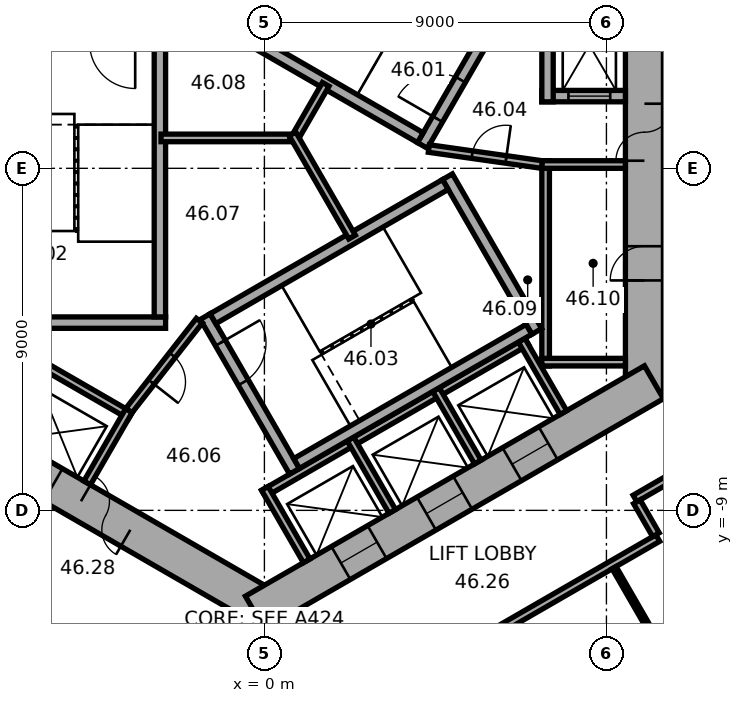
"""IFC4 building model, lengths in metres.
Left out: names, types, materials, properties, quantities, classifications, styles, units other than length and angle.
Written with IfcOpenShell. Run it as: python <this file> out.ifc"""

import sys

from ifc_helpers import new_model, si_unit, direction, frame, frame_2d, origin, place, context, subcontext, project, spatial, rectangle, extrude, element, fill, save


model = new_model("IFC4")
c1 = context("Model", 3, precision=1e-05, world=origin(), true_north=direction((0.0, 1.0)))
c2 = subcontext(c1, "Body", "Model", "MODEL_VIEW")
j1 = project(units=[si_unit("LENGTHUNIT", "METRE"), si_unit("PLANEANGLEUNIT", "RADIAN")], contexts=[c1])
p1 = place(None, origin())
s1 = spatial("IfcSite", under=j1, at=p1, CompositionType="ELEMENT")
p2 = place(p1, origin())
s2 = spatial("IfcBuilding", under=s1, at=p2, CompositionType="ELEMENT")
p3 = place(p2, frame((0.0, 0.0, 187.3)))
s3 = spatial("IfcBuildingStorey", under=s2, at=p3, CompositionType="ELEMENT", Elevation=187.3)
p4 = place(p3, frame((10.0, -6.062, 0.0), z_axis=(0.0, 0.0, 1.0), x_axis=(0.0, 1.0, 0.0)))
e1 = element("IfcWall", 1, at=p4, inside=s3, PredefinedType="SHEAR", context=c2, shape_type="SweptSolid", body=[
    extrude(rectangle(XDim=12.125, YDim=1.0, at=frame_2d((6.062, 0.0))), origin(), (0.0, 0.0, 1.0), 3.7),
])
p5 = place(p4, frame((6.262, 0.0, 0.0)))
e2 = element("IfcOpeningElement", 2, at=p5, cuts=e1, PredefinedType="OPENING", context=c2, shape_type="SweptSolid", body=[
    extrude(rectangle(XDim=1.5, YDim=2.1, at=frame_2d((0.75, 1.05))), frame((0.0, 0.51, 0.0), z_axis=(0.0, -1.0, 0.0), x_axis=(1.0, 0.0, 0.0)), (0.0, 0.0, 1.0), 1.02),
])
p6 = place(p4, frame((3.112, 0.0, 0.0)))
e3 = element("IfcOpeningElement", 3, at=p6, cuts=e1, PredefinedType="OPENING", context=c2, shape_type="SweptSolid", body=[
    extrude(rectangle(XDim=0.9, YDim=2.1, at=frame_2d((0.45, 1.05))), frame((0.0, 0.51, 0.0), z_axis=(0.0, -1.0, 0.0), x_axis=(1.0, 0.0, 0.0)), (0.0, 0.0, 1.0), 1.02),
])
p7 = place(p3, frame((-10.25, -5.629, 0.0), z_axis=(0.0, 0.0, 1.0), x_axis=(0.866022616891, -0.50000482701, 0.0)))
e4 = element("IfcWall", 4, at=p7, inside=s3, PredefinedType="SHEAR", context=c2, shape_type="SweptSolid", body=[
    extrude(rectangle(XDim=12.125, YDim=1.0, at=frame_2d((6.062, 0.0))), origin(), (0.0, 0.0, 1.0), 3.7),
])
p8 = place(p7, frame((6.262, 0.0, 0.0)))
e5 = element("IfcOpeningElement", 5, at=p8, cuts=e4, PredefinedType="OPENING", context=c2, shape_type="SweptSolid", body=[
    extrude(rectangle(XDim=1.5, YDim=2.1, at=frame_2d((0.75, 1.05))), frame((0.0, 0.51, 0.0), z_axis=(0.0, -1.0, 0.0), x_axis=(1.0, 0.0, 0.0)), (0.0, 0.0, 1.0), 1.02),
])
p9 = place(p7, frame((1.712, 0.0, 0.0)))
e6 = element("IfcOpeningElement", 6, at=p9, cuts=e4, PredefinedType="OPENING", context=c2, shape_type="SweptSolid", body=[
    extrude(rectangle(XDim=1.1, YDim=2.1, at=frame_2d((0.55, 1.05))), frame((0.0, 0.51, 0.0), z_axis=(0.0, -1.0, 0.0), x_axis=(1.0, 0.0, 0.0)), (0.0, 0.0, 1.0), 1.02),
])
p10 = place(p7, frame((4.312, 0.0, 0.0)))
e7 = element("IfcOpeningElement", 7, at=p10, cuts=e4, PredefinedType="OPENING", context=c2, shape_type="SweptSolid", body=[
    extrude(rectangle(XDim=1.1, YDim=2.1, at=frame_2d((0.55, 1.05))), frame((0.0, 0.51, 0.0), z_axis=(0.0, -1.0, 0.0), x_axis=(1.0, 0.0, 0.0)), (0.0, 0.0, 1.0), 1.02),
])
p11 = place(p3, frame((-0.25, -11.691, 0.0), z_axis=(0.0, 0.0, 1.0), x_axis=(0.866022616891, 0.50000482701, 0.0)))
e8 = element("IfcWall", 8, at=p11, inside=s3, PredefinedType="SHEAR", context=c2, shape_type="SweptSolid", body=[
    extrude(rectangle(XDim=12.125, YDim=1.0, at=frame_2d((6.062, 0.0))), origin(), (0.0, 0.0, 1.0), 3.7),
])
p12 = place(p11, frame((2.612, 0.0, 0.0)))
e9 = element("IfcOpeningElement", 9, at=p12, cuts=e8, PredefinedType="OPENING", context=c2, shape_type="SweptSolid", body=[
    extrude(rectangle(XDim=1.1, YDim=2.1, at=frame_2d((0.55, 1.05))), frame((0.0, 0.51, 0.0), z_axis=(0.0, -1.0, 0.0), x_axis=(1.0, 0.0, 0.0)), (0.0, 0.0, 1.0), 1.02),
])
p13 = place(p11, frame((5.212, 0.0, 0.0)))
e10 = element("IfcOpeningElement", 10, at=p13, cuts=e8, PredefinedType="OPENING", context=c2, shape_type="SweptSolid", body=[
    extrude(rectangle(XDim=1.1, YDim=2.1, at=frame_2d((0.55, 1.05))), frame((0.0, 0.51, 0.0), z_axis=(0.0, -1.0, 0.0), x_axis=(1.0, 0.0, 0.0)), (0.0, 0.0, 1.0), 1.02),
])
p14 = place(p11, frame((7.812, 0.0, 0.0)))
e11 = element("IfcOpeningElement", 11, at=p14, cuts=e8, PredefinedType="OPENING", context=c2, shape_type="SweptSolid", body=[
    extrude(rectangle(XDim=1.1, YDim=2.1, at=frame_2d((0.55, 1.05))), frame((0.0, 0.51, 0.0), z_axis=(0.0, -1.0, 0.0), x_axis=(1.0, 0.0, 0.0)), (0.0, 0.0, 1.0), 1.02),
])
p15 = place(p3, frame((7.4, -5.2, 0.0), z_axis=(0.0, 0.0, 1.0), x_axis=(0.0, 1.0, 0.0)))
e12 = element("IfcWall", 12, at=p15, inside=s3, PredefinedType="PARTITIONING", context=c2, shape_type="SweptSolid", body=[
    extrude(rectangle(XDim=5.4, YDim=0.2, at=frame_2d((2.7, 0.0))), origin(), (0.0, 0.0, 1.0), 3.42),
])
for number, where, z_axis, x_axis in (
    (13, (7.3, -5.1, 0.0), (0.0, 0.0, 1.0), (1.0, 0.0, 0.0)),
    (14, (7.3, 0.1, 0.0), (0.0, 0.0, 1.0), (1.0, 0.0, 0.0)),
):
    element("IfcWall", number, at=place(p3, frame(where, z_axis=z_axis, x_axis=x_axis)), inside=s3, PredefinedType="PARTITIONING", context=c2, shape_type="SweptSolid", body=[
        extrude(rectangle(XDim=2.2, YDim=0.2, at=frame_2d((1.1, 0.0))), origin(), (0.0, 0.0, 1.0), 3.42),
    ])
p16 = place(p3, frame((-8.203, -3.809, 0.0), z_axis=(0.0, 0.0, 1.0), x_axis=(0.866028230842, -0.499995103361, 0.0)))
e15 = element("IfcWall", 15, at=p16, inside=s3, PredefinedType="PARTITIONING", context=c2, shape_type="SweptSolid", body=[
    extrude(rectangle(XDim=5.4, YDim=0.2, at=frame_2d((2.7, 0.0))), origin(), (0.0, 0.0, 1.0), 3.42),
])
p17 = place(p3, frame((-3.563, -6.372, 0.0), z_axis=(0.0, 0.0, 1.0), x_axis=(-0.499994660107, -0.866028486751, 0.0)))
e16 = element("IfcWall", 16, at=p17, inside=s3, PredefinedType="PARTITIONING", context=c2, shape_type="SweptSolid", body=[
    extrude(rectangle(XDim=2.2, YDim=0.2, at=frame_2d((1.1, 0.0))), origin(), (0.0, 0.0, 1.0), 3.42),
])
p18 = place(p3, frame((-0.024, -8.559, 0.0), z_axis=(0.0, 0.0, 1.0), x_axis=(0.866026010844, 0.49999894854, 0.0)))
e17 = element("IfcWall", 17, at=p18, inside=s3, PredefinedType="PARTITIONING", context=c2, shape_type="SweptSolid", body=[
    extrude(rectangle(XDim=8.0, YDim=0.2, at=frame_2d((4.0, 0.0))), origin(), (0.0, 0.0, 1.0), 3.42),
])
for number, where, z_axis, x_axis in (
    (18, (0.013, -8.422, 0.0), (0.0, 0.0, 1.0), (0.5, -0.866, 0.0)),
    (19, (2.264, -7.122, 0.0), (0.0, 0.0, 1.0), (0.5, -0.866, 0.0)),
    (20, (4.516, -5.822, 0.0), (0.0, 0.0, 1.0), (0.5, -0.866, 0.0)),
    (21, (6.768, -4.522, 0.0), (0.0, 0.0, 1.0), (0.5, -0.866, 0.0)),
):
    element("IfcWall", number, at=place(p3, frame(where, z_axis=z_axis, x_axis=x_axis)), inside=s3, PredefinedType="PARTITIONING", context=c2, shape_type="SweptSolid", body=[
        extrude(rectangle(XDim=2.2, YDim=0.2, at=frame_2d((1.1, 0.0))), origin(), (0.0, 0.0, 1.0), 3.42),
    ])
p19 = place(p3, frame((4.158, 0.602, 0.0), z_axis=(0.0, 0.0, 1.0), x_axis=(0.499977259774, 0.866038532462, 0.0)))
e22 = element("IfcWall", 22, at=p19, inside=s3, PredefinedType="SHEAR", context=c2, shape_type="SweptSolid", body=[
    extrude(rectangle(XDim=4.7, YDim=0.3, at=frame_2d((2.35, 0.0))), origin(), (0.0, 0.0, 1.0), 3.42),
])
p20 = place(p19, frame((0.8, 0.0, 0.0)))
e23 = element("IfcOpeningElement", 23, at=p20, cuts=e22, PredefinedType="OPENING", context=c2, shape_type="SweptSolid", body=[
    extrude(rectangle(XDim=1.2, YDim=2.1, at=frame_2d((0.6, 1.05))), frame((0.0, 0.16, 0.0), z_axis=(0.0, -1.0, 0.0), x_axis=(1.0, 0.0, 0.0)), (0.0, 0.0, 1.0), 0.32),
])
p21 = place(p3, frame((4.103, 0.807, 0.0), z_axis=(0.0, 0.0, 1.0), x_axis=(-0.866027801685, 0.499995846692, 0.0)))
e24 = element("IfcWall", 24, at=p21, inside=s3, PredefinedType="SHEAR", context=c2, shape_type="SweptSolid", body=[
    extrude(rectangle(XDim=7.06, YDim=0.3, at=frame_2d((3.53, 0.0))), origin(), (0.0, 0.0, 1.0), 3.42),
])
p22 = place(p3, frame((-2.6, -4.06, 0.0), z_axis=(0.0, 0.0, 1.0), x_axis=(-1.0, 0.0, 0.0)))
e25 = element("IfcWall", 25, at=p22, inside=s3, PredefinedType="SHEAR", context=c2, shape_type="SweptSolid", body=[
    extrude(rectangle(XDim=4.7, YDim=0.3, at=frame_2d((2.35, 0.0))), origin(), (0.0, 0.0, 1.0), 3.42),
])
p23 = place(p3, frame((-2.75, 3.15, 0.0), z_axis=(0.0, 0.0, 1.0), x_axis=(0.0, -1.0, 0.0)))
e26 = element("IfcWall", 26, at=p23, inside=s3, PredefinedType="SHEAR", context=c2, shape_type="SweptSolid", body=[
    extrude(rectangle(XDim=7.06, YDim=0.3, at=frame_2d((3.53, 0.0))), origin(), (0.0, 0.0, 1.0), 3.42),
])
p24 = place(p3, frame((-1.558, -3.902, 0.0), z_axis=(0.0, 0.0, 1.0), x_axis=(0.499977259774, -0.866038532462, 0.0)))
e27 = element("IfcWall", 27, at=p24, inside=s3, PredefinedType="SHEAR", context=c2, shape_type="SweptSolid", body=[
    extrude(rectangle(XDim=4.7, YDim=0.3, at=frame_2d((2.35, 0.0))), origin(), (0.0, 0.0, 1.0), 3.42),
])
p25 = place(p24, frame((0.8, 0.0, 0.0)))
e28 = element("IfcOpeningElement", 28, at=p25, cuts=e27, PredefinedType="OPENING", context=c2, shape_type="SweptSolid", body=[
    extrude(rectangle(XDim=1.2, YDim=2.1, at=frame_2d((0.6, 1.05))), frame((0.0, 0.16, 0.0), z_axis=(0.0, -1.0, 0.0), x_axis=(1.0, 0.0, 0.0)), (0.0, 0.0, 1.0), 0.32),
])
p26 = place(p3, frame((4.816, -0.222, 0.0), z_axis=(0.0, 0.0, 1.0), x_axis=(0.499977259774, -0.866038532462, 0.0)))
e29 = element("IfcWall", 29, at=p26, inside=s3, PredefinedType="SHEAR", context=c2, shape_type="SweptSolid", body=[
    extrude(rectangle(XDim=4.7, YDim=0.3, at=frame_2d((2.35, 0.0))), origin(), (0.0, 0.0, 1.0), 3.42),
])
for number, where, z_axis, x_axis in (
    (30, (-1.353, -3.957, 0.0), (0.0, 0.0, 1.0), (0.866, 0.5, 0.0)),
    (31, (0.847, -7.767, 0.0), (0.0, 0.0, 1.0), (0.866, 0.5, 0.0)),
):
    element("IfcWall", number, at=place(p3, frame(where, z_axis=z_axis, x_axis=x_axis)), inside=s3, PredefinedType="SHEAR", context=c2, shape_type="SweptSolid", body=[
        extrude(rectangle(XDim=7.06, YDim=0.3, at=frame_2d((3.53, 0.0))), origin(), (0.0, 0.0, 1.0), 3.42),
    ])
p27 = place(p3, frame((7.3, 1.9, 0.0), z_axis=(0.0, 0.0, 1.0), x_axis=(1.0, 0.0, 0.0)))
e32 = element("IfcWall", 32, at=p27, inside=s3, PredefinedType="SHEAR", context=c2, shape_type="SweptSolid", body=[
    extrude(rectangle(XDim=2.2, YDim=0.3, at=frame_2d((1.1, 0.0))), origin(), (0.0, 0.0, 1.0), 3.42),
])
p28 = place(p27, frame((0.7, 0.0, 0.0)))
e33 = element("IfcOpeningElement", 33, at=p28, cuts=e32, PredefinedType="OPENING", context=c2, shape_type="SweptSolid", body=[
    extrude(rectangle(XDim=1.1, YDim=2.1, at=frame_2d((0.55, 1.05))), frame((0.0, 0.16, 0.0), z_axis=(0.0, -1.0, 0.0), x_axis=(1.0, 0.0, 0.0)), (0.0, 0.0, 1.0), 0.32),
])
p29 = place(p3, frame((7.45, 1.75, 0.0), z_axis=(0.0, 0.0, 1.0), x_axis=(0.0, 1.0, 0.0)))
e34 = element("IfcWall", 34, at=p29, inside=s3, PredefinedType="SHEAR", context=c2, shape_type="SweptSolid", body=[
    extrude(rectangle(XDim=3.35, YDim=0.3, at=frame_2d((1.675, 0.0))), origin(), (0.0, 0.0, 1.0), 3.42),
])
p30 = place(p3, frame((4.327, 0.521, 0.0), z_axis=(0.0, 0.0, 1.0), x_axis=(0.990124376366, -0.14019172346, 0.0)))
e35 = element("IfcWall", 35, at=p30, inside=s3, PredefinedType="PARTITIONING", context=c2, shape_type="SweptSolid", body=[
    extrude(rectangle(XDim=3.002, YDim=0.2, at=frame_2d((1.501, 0.0))), origin(), (0.0, 0.0, 1.0), 3.42),
])
p31 = place(p30, frame((1.15, 0.0, 0.0)))
e36 = element("IfcOpeningElement", 36, at=p31, cuts=e35, PredefinedType="OPENING", context=c2, shape_type="SweptSolid", body=[
    extrude(rectangle(XDim=0.9, YDim=2.1, at=frame_2d((0.45, 1.05))), frame((0.0, 0.11, 0.0), z_axis=(0.0, -1.0, 0.0), x_axis=(1.0, 0.0, 0.0)), (0.0, 0.0, 1.0), 0.22),
])
p32 = place(p3, frame((-1.712, -4.008, 0.0), z_axis=(0.0, 0.0, 1.0), x_axis=(-0.616549420702, -0.787316208287, 0.0)))
e37 = element("IfcWall", 37, at=p32, inside=s3, PredefinedType="PARTITIONING", context=c2, shape_type="SweptSolid", body=[
    extrude(rectangle(XDim=3.002, YDim=0.2, at=frame_2d((1.501, 0.0))), origin(), (0.0, 0.0, 1.0), 3.42),
])
p33 = place(p32, frame((1.15, 0.0, 0.0)))
e38 = element("IfcOpeningElement", 38, at=p33, cuts=e37, PredefinedType="OPENING", context=c2, shape_type="SweptSolid", body=[
    extrude(rectangle(XDim=0.9, YDim=2.1, at=frame_2d((0.45, 1.05))), frame((0.0, 0.11, 0.0), z_axis=(0.0, -1.0, 0.0), x_axis=(1.0, 0.0, 0.0)), (0.0, 0.0, 1.0), 0.22),
])
p34 = place(p3, frame((0.92, 0.8, 0.0), z_axis=(0.0, 0.0, 1.0), x_axis=(-1.0, 0.0, 0.0)))
e39 = element("IfcWall", 39, at=p34, inside=s3, PredefinedType="PARTITIONING", context=c2, shape_type="SweptSolid", body=[
    extrude(rectangle(XDim=3.64, YDim=0.2, at=frame_2d((1.82, 0.0))), origin(), (0.0, 0.0, 1.0), 3.42),
])
p35 = place(p3, frame((0.74, 0.696, 0.0), z_axis=(0.0, 0.0, 1.0), x_axis=(0.499956301907, 0.86605063142, 0.0)))
e40 = element("IfcWall", 40, at=p35, inside=s3, PredefinedType="PARTITIONING", context=c2, shape_type="SweptSolid", body=[
    extrude(rectangle(XDim=1.747, YDim=0.2, at=frame_2d((0.874, 0.0))), origin(), (0.0, 0.0, 1.0), 3.42),
])
p36 = place(p3, frame((0.74, 0.904, 0.0), z_axis=(0.0, 0.0, 1.0), x_axis=(0.500028278809, -0.866009076391, 0.0)))
e41 = element("IfcWall", 41, at=p36, inside=s3, PredefinedType="PARTITIONING", context=c2, shape_type="SweptSolid", body=[
    extrude(rectangle(XDim=3.133, YDim=0.2, at=frame_2d((1.566, 0.0))), origin(), (0.0, 0.0, 1.0), 3.42),
])
p37 = place(p3, frame((5.342, -12.621, 0.0), z_axis=(0.0, 0.0, 1.0), x_axis=(0.866024665123, 0.500001279396, 0.0)))
e42 = element("IfcWall", 42, at=p37, inside=s3, PredefinedType="PARTITIONING", context=c2, shape_type="SweptSolid", body=[
    extrude(rectangle(XDim=5.786, YDim=0.2, at=frame_2d((2.893, 0.0))), origin(), (0.0, 0.0, 1.0), 3.42),
])
p38 = place(p3, frame((9.202, -10.508, 0.0), z_axis=(0.0, 0.0, 1.0), x_axis=(0.500043961785, -0.866000020948, 0.0)))
e43 = element("IfcWall", 43, at=p38, inside=s3, PredefinedType="PARTITIONING", context=c2, shape_type="SweptSolid", body=[
    extrude(rectangle(XDim=3.9, YDim=0.12, at=frame_2d((1.95, 0.0))), origin(), (0.0, 0.0, 1.0), 3.42),
])
p39 = place(p3, frame((9.752, -8.688, 0.0), z_axis=(0.0, 0.0, 1.0), x_axis=(0.865974105138, 0.500088841337, 0.0)))
e44 = element("IfcWall", 44, at=p39, inside=s3, PredefinedType="PARTITIONING", context=c2, shape_type="SweptSolid", body=[
    extrude(rectangle(XDim=1.961, YDim=0.2, at=frame_2d((0.98, 0.0))), origin(), (0.0, 0.0, 1.0), 3.42),
])
p40 = place(p3, frame((10.302, -9.642, 0.0), z_axis=(0.0, 0.0, 1.0), x_axis=(-0.500074377092, 0.865982457891, 0.0)))
e45 = element("IfcWall", 45, at=p40, inside=s3, PredefinedType="PARTITIONING", context=c2, shape_type="SweptSolid", body=[
    extrude(rectangle(XDim=1.001, YDim=0.2, at=frame_2d((0.5, 0.0))), origin(), (0.0, 0.0, 1.0), 3.42),
])
p41 = place(p5, origin())
e46 = element("IfcDoor", 46, at=p41, inside=s3, OperationType="DOUBLE_DOOR_SINGLE_SWING", PredefinedType="DOOR", context=c2, shape_type="SweptSolid", body=[
    extrude(rectangle(XDim=1.5, YDim=2.1, at=frame_2d((0.75, 1.05))), frame((0.0, 0.025, 0.0), z_axis=(0.0, -1.0, 0.0), x_axis=(1.0, 0.0, 0.0)), (0.0, 0.0, 1.0), 0.05),
])
fill(e2, e46)
p42 = place(p8, origin())
e47 = element("IfcDoor", 47, at=p42, inside=s3, OperationType="DOUBLE_DOOR_SINGLE_SWING", PredefinedType="DOOR", context=c2, shape_type="SweptSolid", body=[
    extrude(rectangle(XDim=1.5, YDim=2.1, at=frame_2d((0.75, 1.05))), frame((0.0, 0.025, 0.0), z_axis=(0.0, -1.0, 0.0), x_axis=(1.0, 0.0, 0.0)), (0.0, 0.0, 1.0), 0.05),
])
fill(e5, e47)
p43 = place(p20, origin())
e48 = element("IfcDoor", 48, at=p43, inside=s3, OperationType="SINGLE_SWING_RIGHT", PredefinedType="DOOR", context=c2, shape_type="SweptSolid", body=[
    extrude(rectangle(XDim=1.2, YDim=2.1, at=frame_2d((0.6, 1.05))), frame((0.0, 0.025, 0.0), z_axis=(0.0, -1.0, 0.0), x_axis=(1.0, 0.0, 0.0)), (0.0, 0.0, 1.0), 0.05),
])
fill(e23, e48)
p44 = place(p25, origin())
e49 = element("IfcDoor", 49, at=p44, inside=s3, OperationType="SINGLE_SWING_RIGHT", PredefinedType="DOOR", context=c2, shape_type="SweptSolid", body=[
    extrude(rectangle(XDim=1.2, YDim=2.1, at=frame_2d((0.6, 1.05))), frame((0.0, 0.025, 0.0), z_axis=(0.0, -1.0, 0.0), x_axis=(1.0, 0.0, 0.0)), (0.0, 0.0, 1.0), 0.05),
])
fill(e28, e49)
p45 = place(p31, origin())
e50 = element("IfcDoor", 50, at=p45, inside=s3, OperationType="SINGLE_SWING_LEFT", PredefinedType="DOOR", context=c2, shape_type="SweptSolid", body=[
    extrude(rectangle(XDim=0.9, YDim=2.1, at=frame_2d((0.45, 1.05))), frame((0.0, 0.025, 0.0), z_axis=(0.0, -1.0, 0.0), x_axis=(1.0, 0.0, 0.0)), (0.0, 0.0, 1.0), 0.05),
])
fill(e36, e50)
p46 = place(p33, origin())
e51 = element("IfcDoor", 51, at=p46, inside=s3, OperationType="SINGLE_SWING_LEFT", PredefinedType="DOOR", context=c2, shape_type="SweptSolid", body=[
    extrude(rectangle(XDim=0.9, YDim=2.1, at=frame_2d((0.45, 1.05))), frame((0.0, 0.025, 0.0), z_axis=(0.0, -1.0, 0.0), x_axis=(1.0, 0.0, 0.0)), (0.0, 0.0, 1.0), 0.05),
])
fill(e38, e51)
p47 = place(p6, origin())
e52 = element("IfcDoor", 52, at=p47, inside=s3, OperationType="SINGLE_SWING_LEFT", PredefinedType="DOOR", context=c2, shape_type="SweptSolid", body=[
    extrude(rectangle(XDim=0.9, YDim=2.1, at=frame_2d((0.45, 1.05))), frame((0.0, 0.025, 0.0), z_axis=(0.0, -1.0, 0.0), x_axis=(1.0, 0.0, 0.0)), (0.0, 0.0, 1.0), 0.05),
])
fill(e3, e52)
p48 = place(p28, origin())
e53 = element("IfcDoor", 53, at=p48, inside=s3, OperationType="DOUBLE_DOOR_SLIDING", PredefinedType="DOOR", context=c2, shape_type="SweptSolid", body=[
    extrude(rectangle(XDim=1.1, YDim=2.1, at=frame_2d((0.55, 1.05))), frame((0.0, 0.025, 0.0), z_axis=(0.0, -1.0, 0.0), x_axis=(1.0, 0.0, 0.0)), (0.0, 0.0, 1.0), 0.05),
])
fill(e33, e53)
p49 = place(p10, origin())
e54 = element("IfcDoor", 54, at=p49, inside=s3, OperationType="DOUBLE_DOOR_SLIDING", PredefinedType="DOOR", context=c2, shape_type="SweptSolid", body=[
    extrude(rectangle(XDim=1.1, YDim=2.1, at=frame_2d((0.55, 1.05))), frame((0.0, 0.025, 0.0), z_axis=(0.0, -1.0, 0.0), x_axis=(1.0, 0.0, 0.0)), (0.0, 0.0, 1.0), 0.05),
])
fill(e7, e54)
p50 = place(p12, origin())
e55 = element("IfcDoor", 55, at=p50, inside=s3, OperationType="DOUBLE_DOOR_SLIDING", PredefinedType="DOOR", context=c2, shape_type="SweptSolid", body=[
    extrude(rectangle(XDim=1.1, YDim=2.1, at=frame_2d((0.55, 1.05))), frame((0.0, 0.025, 0.0), z_axis=(0.0, -1.0, 0.0), x_axis=(1.0, 0.0, 0.0)), (0.0, 0.0, 1.0), 0.05),
])
fill(e9, e55)
p51 = place(p13, origin())
e56 = element("IfcDoor", 56, at=p51, inside=s3, OperationType="DOUBLE_DOOR_SLIDING", PredefinedType="DOOR", context=c2, shape_type="SweptSolid", body=[
    extrude(rectangle(XDim=1.1, YDim=2.1, at=frame_2d((0.55, 1.05))), frame((0.0, 0.025, 0.0), z_axis=(0.0, -1.0, 0.0), x_axis=(1.0, 0.0, 0.0)), (0.0, 0.0, 1.0), 0.05),
])
fill(e10, e56)
p52 = place(p14, origin())
e57 = element("IfcDoor", 57, at=p52, inside=s3, OperationType="DOUBLE_DOOR_SLIDING", PredefinedType="DOOR", context=c2, shape_type="SweptSolid", body=[
    extrude(rectangle(XDim=1.1, YDim=2.1, at=frame_2d((0.55, 1.05))), frame((0.0, 0.025, 0.0), z_axis=(0.0, -1.0, 0.0), x_axis=(1.0, 0.0, 0.0)), (0.0, 0.0, 1.0), 0.05),
])
fill(e11, e57)
save(model, sys.argv[1])
